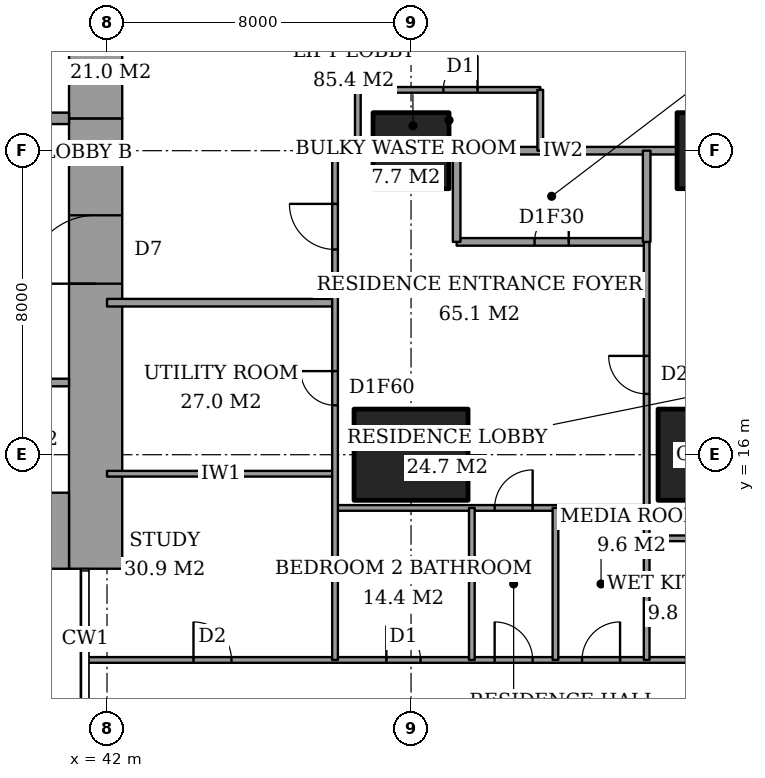
"""IFC4 building model, lengths in metres.
Left out: names, types, materials, properties, quantities, classifications, styles, units other than length and angle.
Written with IfcOpenShell. Run it as: python <this file> out.ifc"""

import sys

from ifc_helpers import new_model, si_unit, direction, frame, frame_2d, origin, origin_2d, place, context, subcontext, project, spatial, rectangle, extrude, element, fill, save


model = new_model("IFC4")
c1 = context("Model", 3, precision=1e-05, world=origin(), true_north=direction((0.0, 1.0)))
c2 = subcontext(c1, "Body", "Model", "MODEL_VIEW")
j1 = project(units=[si_unit("LENGTHUNIT", "METRE"), si_unit("PLANEANGLEUNIT", "RADIAN")], contexts=[c1])
p1 = place(None, origin())
s1 = spatial("IfcSite", under=j1, at=p1, CompositionType="ELEMENT")
p2 = place(p1, origin())
s2 = spatial("IfcBuilding", under=s1, at=p2, CompositionType="ELEMENT")
p3 = place(p2, frame((0.0, 0.0, 33.2)))
s3 = spatial("IfcBuildingStorey", under=s2, at=p3, CompositionType="ELEMENT", Elevation=33.2)
p4 = place(p3, frame((50.0, 16.0, 0.0), z_axis=(0.0, 0.0, 1.0), x_axis=(1.0, 0.0, 0.0)))
e1 = element("IfcColumn", 1, at=p4, inside=s3, PredefinedType="COLUMN", context=c2, shape_type="SweptSolid", body=[
    extrude(rectangle(XDim=3.0, YDim=2.4, at=origin_2d()), origin(), (0.0, 0.0, 1.0), 3.6),
])
p5 = place(p3, frame((50.0, 24.0, 0.0), z_axis=(0.0, 0.0, 1.0), x_axis=(1.0, 0.0, 0.0)))
e2 = element("IfcColumn", 2, at=p5, inside=s3, PredefinedType="COLUMN", context=c2, shape_type="SweptSolid", body=[
    extrude(rectangle(XDim=2.0, YDim=2.0, at=origin_2d()), origin(), (0.0, 0.0, 1.0), 3.6),
])
p6 = place(p3, frame((58.0, 16.0, 0.0), z_axis=(0.0, 0.0, 1.0), x_axis=(1.0, 0.0, 0.0)))
e3 = element("IfcColumn", 3, at=p6, inside=s3, PredefinedType="COLUMN", context=c2, shape_type="SweptSolid", body=[
    extrude(rectangle(XDim=3.0, YDim=2.4, at=origin_2d()), origin(), (0.0, 0.0, 1.0), 3.6),
])
p7 = place(p3, frame((58.0, 24.0, 0.0), z_axis=(0.0, 0.0, 1.0), x_axis=(1.0, 0.0, 0.0)))
e4 = element("IfcColumn", 4, at=p7, inside=s3, PredefinedType="COLUMN", context=c2, shape_type="SweptSolid", body=[
    extrude(rectangle(XDim=2.0, YDim=2.0, at=origin_2d()), origin(), (0.0, 0.0, 1.0), 3.6),
])
p8 = place(p3, frame((37.85, 14.0, 0.0), z_axis=(0.0, 0.0, 1.0), x_axis=(1.0, 0.0, 0.0)))
e5 = element("IfcWall", 5, at=p8, inside=s3, PredefinedType="SHEAR", context=c2, shape_type="SweptSolid", body=[
    extrude(rectangle(XDim=3.15, YDim=2.0, at=frame_2d((1.575, 0.0))), origin(), (0.0, 0.0, 1.0), 3.6),
])
p9 = place(p3, frame((41.7, 13.0, 0.0), z_axis=(0.0, 0.0, 1.0), x_axis=(0.0, 1.0, 0.0)))
e6 = element("IfcWall", 6, at=p9, inside=s3, PredefinedType="SHEAR", context=c2, shape_type="SweptSolid", body=[
    extrude(rectangle(XDim=11.85, YDim=1.4, at=frame_2d((5.925, 0.0))), origin(), (0.0, 0.0, 1.0), 3.6),
])
p10 = place(p9, frame((7.5, 0.0, 0.0)))
e7 = element("IfcOpeningElement", 7, at=p10, cuts=e6, PredefinedType="OPENING", context=c2, shape_type="SweptSolid", body=[
    extrude(rectangle(XDim=1.8, YDim=2.4, at=frame_2d((0.9, 1.2))), frame((0.0, 0.71, 0.0), z_axis=(0.0, -1.0, 0.0), x_axis=(1.0, 0.0, 0.0)), (0.0, 0.0, 1.0), 1.42),
])
p11 = place(p3, frame((41.7, 24.85, 0.0), z_axis=(0.0, 0.0, 1.0), x_axis=(0.0, 1.0, 0.0)))
e8 = element("IfcWall", 8, at=p11, inside=s3, PredefinedType="SHEAR", context=c2, shape_type="SweptSolid", body=[
    extrude(rectangle(XDim=10.15, YDim=1.4, at=frame_2d((5.075, 0.0))), origin(), (0.0, 0.0, 1.0), 3.6),
])
p12 = place(p3, frame((37.85, 24.85, 0.0), z_axis=(0.0, 0.0, 1.0), x_axis=(1.0, 0.0, 0.0)))
e9 = element("IfcWall", 9, at=p12, inside=s3, PredefinedType="SHEAR", context=c2, shape_type="SweptSolid", body=[
    extrude(rectangle(XDim=3.15, YDim=0.3, at=frame_2d((1.575, 0.0))), origin(), (0.0, 0.0, 1.0), 3.6),
])
p13 = place(p12, frame((0.95, 0.0, 0.0)))
e10 = element("IfcOpeningElement", 10, at=p13, cuts=e9, PredefinedType="OPENING", context=c2, shape_type="SweptSolid", body=[
    extrude(rectangle(XDim=1.0, YDim=2.1, at=frame_2d((0.5, 1.05))), frame((0.0, 0.16, 0.0), z_axis=(0.0, -1.0, 0.0), x_axis=(1.0, 0.0, 0.0)), (0.0, 0.0, 1.0), 0.32),
])
p14 = place(p3, frame((41.439, 10.6, 0.0), z_axis=(0.0, 0.0, 1.0), x_axis=(1.0, 0.0, 0.0)))
e11 = element("IfcWall", 11, at=p14, inside=s3, PredefinedType="PARTITIONING", context=c2, shape_type="SweptSolid", body=[
    extrude(rectangle(XDim=25.011, YDim=0.15, at=frame_2d((12.505, 0.0))), origin(), (0.0, 0.0, 1.0), 3.35),
])
p15 = place(p14, frame((10.761, 0.0, 0.0)))
e12 = element("IfcOpeningElement", 12, at=p15, cuts=e11, PredefinedType="OPENING", context=c2, shape_type="SweptSolid", body=[
    extrude(rectangle(XDim=1.0, YDim=2.1, at=frame_2d((0.5, 1.05))), frame((0.0, 0.085, 0.0), z_axis=(0.0, -1.0, 0.0), x_axis=(1.0, 0.0, 0.0)), (0.0, 0.0, 1.0), 0.17),
])
p16 = place(p14, frame((20.924, 0.0, 0.0)))
e13 = element("IfcOpeningElement", 13, at=p16, cuts=e11, PredefinedType="OPENING", context=c2, shape_type="SweptSolid", body=[
    extrude(rectangle(XDim=1.0, YDim=2.1, at=frame_2d((0.5, 1.05))), frame((0.0, 0.085, 0.0), z_axis=(0.0, -1.0, 0.0), x_axis=(1.0, 0.0, 0.0)), (0.0, 0.0, 1.0), 0.17),
])
p17 = place(p14, frame((15.799, 0.0, 0.0)))
e14 = element("IfcOpeningElement", 14, at=p17, cuts=e11, PredefinedType="OPENING", context=c2, shape_type="SweptSolid", body=[
    extrude(rectangle(XDim=1.0, YDim=2.1, at=frame_2d((0.5, 1.05))), frame((0.0, 0.085, 0.0), z_axis=(0.0, -1.0, 0.0), x_axis=(1.0, 0.0, 0.0)), (0.0, 0.0, 1.0), 0.17),
])
p18 = place(p14, frame((13.061, 0.0, 0.0)))
e15 = element("IfcOpeningElement", 15, at=p18, cuts=e11, PredefinedType="OPENING", context=c2, shape_type="SweptSolid", body=[
    extrude(rectangle(XDim=1.0, YDim=2.1, at=frame_2d((0.5, 1.05))), frame((0.0, 0.085, 0.0), z_axis=(0.0, -1.0, 0.0), x_axis=(1.0, 0.0, 0.0)), (0.0, 0.0, 1.0), 0.17),
])
p19 = place(p14, frame((7.911, 0.0, 0.0)))
e16 = element("IfcOpeningElement", 16, at=p19, cuts=e11, PredefinedType="OPENING", context=c2, shape_type="SweptSolid", body=[
    extrude(rectangle(XDim=0.9, YDim=2.1, at=frame_2d((0.45, 1.05))), frame((0.0, 0.085, 0.0), z_axis=(0.0, -1.0, 0.0), x_axis=(1.0, 0.0, 0.0)), (0.0, 0.0, 1.0), 0.17),
])
p20 = place(p14, frame((2.836, 0.0, 0.0)))
e17 = element("IfcOpeningElement", 17, at=p20, cuts=e11, PredefinedType="OPENING", context=c2, shape_type="SweptSolid", body=[
    extrude(rectangle(XDim=1.0, YDim=2.1, at=frame_2d((0.5, 1.05))), frame((0.0, 0.085, 0.0), z_axis=(0.0, -1.0, 0.0), x_axis=(1.0, 0.0, 0.0)), (0.0, 0.0, 1.0), 0.17),
])
p21 = place(p3, frame((56.2, 13.8, 0.0), z_axis=(0.0, 0.0, 1.0), x_axis=(1.0, 0.0, 0.0)))
e18 = element("IfcWall", 18, at=p21, inside=s3, PredefinedType="PARTITIONING", context=c2, shape_type="SweptSolid", body=[
    extrude(rectangle(XDim=3.075, YDim=0.15, at=frame_2d((1.538, 0.0))), origin(), (0.0, 0.0, 1.0), 3.35),
])
p22 = place(p3, frame((48.0, 14.6, 0.0), z_axis=(0.0, 0.0, 1.0), x_axis=(1.0, 0.0, 0.0)))
e19 = element("IfcWall", 19, at=p22, inside=s3, PredefinedType="PARTITIONING", context=c2, shape_type="SweptSolid", body=[
    extrude(rectangle(XDim=8.2, YDim=0.15, at=frame_2d((4.1, 0.0))), origin(), (0.0, 0.0, 1.0), 3.35),
])
p23 = place(p22, frame((4.2, 0.0, 0.0)))
e20 = element("IfcOpeningElement", 20, at=p23, cuts=e19, PredefinedType="OPENING", context=c2, shape_type="SweptSolid", body=[
    extrude(rectangle(XDim=1.0, YDim=2.1, at=frame_2d((0.5, 1.05))), frame((0.0, 0.085, 0.0), z_axis=(0.0, -1.0, 0.0), x_axis=(1.0, 0.0, 0.0)), (0.0, 0.0, 1.0), 0.17),
])
p24 = place(p3, frame((42.0, 15.5, 0.0), z_axis=(0.0, 0.0, 1.0), x_axis=(1.0, 0.0, 0.0)))
e21 = element("IfcWall", 21, at=p24, inside=s3, PredefinedType="PARTITIONING", context=c2, shape_type="SweptSolid", body=[
    extrude(rectangle(XDim=6.0, YDim=0.15, at=frame_2d((3.0, 0.0))), origin(), (0.0, 0.0, 1.0), 3.35),
])
p25 = place(p3, frame((42.0, 20.0, 0.0), z_axis=(0.0, 0.0, 1.0), x_axis=(1.0, 0.0, 0.0)))
e22 = element("IfcWall", 22, at=p25, inside=s3, PredefinedType="PARTITIONING", context=c2, shape_type="SweptSolid", body=[
    extrude(rectangle(XDim=6.0, YDim=0.2, at=frame_2d((3.0, 0.0))), origin(), (0.0, 0.0, 1.0), 3.35),
])
p26 = place(p3, frame((51.2, 21.6, 0.0), z_axis=(0.0, 0.0, 1.0), x_axis=(1.0, 0.0, 0.0)))
e23 = element("IfcWall", 23, at=p26, inside=s3, PredefinedType="PARTITIONING", context=c2, shape_type="SweptSolid", body=[
    extrude(rectangle(XDim=5.0, YDim=0.2, at=frame_2d((2.5, 0.0))), origin(), (0.0, 0.0, 1.0), 3.35),
])
p27 = place(p26, frame((2.05, 0.0, 0.0)))
e24 = element("IfcOpeningElement", 24, at=p27, cuts=e23, PredefinedType="OPENING", context=c2, shape_type="SweptSolid", body=[
    extrude(rectangle(XDim=0.9, YDim=2.1, at=frame_2d((0.45, 1.05))), frame((0.0, 0.11, 0.0), z_axis=(0.0, -1.0, 0.0), x_axis=(1.0, 0.0, 0.0)), (0.0, 0.0, 1.0), 0.22),
])
p28 = place(p3, frame((48.0, 24.0, 0.0), z_axis=(0.0, 0.0, 1.0), x_axis=(1.0, 0.0, 0.0)))
e25 = element("IfcWall", 25, at=p28, inside=s3, PredefinedType="PARTITIONING", context=c2, shape_type="SweptSolid", body=[
    extrude(rectangle(XDim=1.0, YDim=0.2, at=frame_2d((0.5, 0.0))), origin(), (0.0, 0.0, 1.0), 3.35),
])
p29 = place(p3, frame((51.0, 24.0, 0.0), z_axis=(0.0, 0.0, 1.0), x_axis=(1.0, 0.0, 0.0)))
e26 = element("IfcWall", 26, at=p29, inside=s3, PredefinedType="PARTITIONING", context=c2, shape_type="SweptSolid", body=[
    extrude(rectangle(XDim=6.0, YDim=0.2, at=frame_2d((3.0, 0.0))), origin(), (0.0, 0.0, 1.0), 3.35),
])
p30 = place(p3, frame((48.6, 25.6, 0.0), z_axis=(0.0, 0.0, 1.0), x_axis=(1.0, 0.0, 0.0)))
e27 = element("IfcWall", 27, at=p30, inside=s3, PredefinedType="PARTITIONING", context=c2, shape_type="SweptSolid", body=[
    extrude(rectangle(XDim=4.8, YDim=0.15, at=frame_2d((2.4, 0.0))), origin(), (0.0, 0.0, 1.0), 3.35),
])
p31 = place(p30, frame((2.25, 0.0, 0.0)))
e28 = element("IfcOpeningElement", 28, at=p31, cuts=e27, PredefinedType="OPENING", context=c2, shape_type="SweptSolid", body=[
    extrude(rectangle(XDim=0.9, YDim=2.1, at=frame_2d((0.45, 1.05))), frame((0.0, 0.085, 0.0), z_axis=(0.0, -1.0, 0.0), x_axis=(1.0, 0.0, 0.0)), (0.0, 0.0, 1.0), 0.17),
])
p32 = place(p3, frame((48.0, 10.6, 0.0), z_axis=(0.0, 0.0, 1.0), x_axis=(0.0, 1.0, 0.0)))
e29 = element("IfcWall", 29, at=p32, inside=s3, PredefinedType="PARTITIONING", context=c2, shape_type="SweptSolid", body=[
    extrude(rectangle(XDim=13.4, YDim=0.15, at=frame_2d((6.7, 0.0))), origin(), (0.0, 0.0, 1.0), 3.35),
])
p33 = place(p32, frame((10.8, 0.0, 0.0)))
e30 = element("IfcOpeningElement", 30, at=p33, cuts=e29, PredefinedType="OPENING", context=c2, shape_type="SweptSolid", body=[
    extrude(rectangle(XDim=1.2, YDim=2.4, at=frame_2d((0.6, 1.2))), frame((0.0, 0.085, 0.0), z_axis=(0.0, -1.0, 0.0), x_axis=(1.0, 0.0, 0.0)), (0.0, 0.0, 1.0), 0.17),
])
p34 = place(p32, frame((6.7, 0.0, 0.0)))
e31 = element("IfcOpeningElement", 31, at=p34, cuts=e29, PredefinedType="OPENING", context=c2, shape_type="SweptSolid", body=[
    extrude(rectangle(XDim=0.9, YDim=2.1, at=frame_2d((0.45, 1.05))), frame((0.0, 0.085, 0.0), z_axis=(0.0, -1.0, 0.0), x_axis=(1.0, 0.0, 0.0)), (0.0, 0.0, 1.0), 0.17),
])
p35 = place(p3, frame((48.6, 24.0, 0.0), z_axis=(0.0, 0.0, 1.0), x_axis=(0.0, 1.0, 0.0)))
e32 = element("IfcWall", 32, at=p35, inside=s3, PredefinedType="PARTITIONING", context=c2, shape_type="SweptSolid", body=[
    extrude(rectangle(XDim=1.6, YDim=0.15, at=frame_2d((0.8, 0.0))), origin(), (0.0, 0.0, 1.0), 3.35),
])
p36 = place(p3, frame((51.2, 21.6, 0.0), z_axis=(0.0, 0.0, 1.0), x_axis=(0.0, 1.0, 0.0)))
e33 = element("IfcWall", 33, at=p36, inside=s3, PredefinedType="PARTITIONING", context=c2, shape_type="SweptSolid", body=[
    extrude(rectangle(XDim=2.4, YDim=0.2, at=frame_2d((1.2, 0.0))), origin(), (0.0, 0.0, 1.0), 3.35),
])
p37 = place(p3, frame((51.6, 10.6, 0.0), z_axis=(0.0, 0.0, 1.0), x_axis=(0.0, 1.0, 0.0)))
e34 = element("IfcWall", 34, at=p37, inside=s3, PredefinedType="PARTITIONING", context=c2, shape_type="SweptSolid", body=[
    extrude(rectangle(XDim=4.0, YDim=0.15, at=frame_2d((2.0, 0.0))), origin(), (0.0, 0.0, 1.0), 3.35),
])
p38 = place(p3, frame((53.4, 24.0, 0.0), z_axis=(0.0, 0.0, 1.0), x_axis=(0.0, 1.0, 0.0)))
e35 = element("IfcWall", 35, at=p38, inside=s3, PredefinedType="PARTITIONING", context=c2, shape_type="SweptSolid", body=[
    extrude(rectangle(XDim=1.6, YDim=0.15, at=frame_2d((0.8, 0.0))), origin(), (0.0, 0.0, 1.0), 3.35),
])
p39 = place(p3, frame((53.8, 10.6, 0.0), z_axis=(0.0, 0.0, 1.0), x_axis=(0.0, 1.0, 0.0)))
e36 = element("IfcWall", 36, at=p39, inside=s3, PredefinedType="PARTITIONING", context=c2, shape_type="SweptSolid", body=[
    extrude(rectangle(XDim=4.0, YDim=0.15, at=frame_2d((2.0, 0.0))), origin(), (0.0, 0.0, 1.0), 3.35),
])
p40 = place(p3, frame((56.2, 21.6, 0.0), z_axis=(0.0, 0.0, 1.0), x_axis=(0.0, 1.0, 0.0)))
e37 = element("IfcWall", 37, at=p40, inside=s3, PredefinedType="PARTITIONING", context=c2, shape_type="SweptSolid", body=[
    extrude(rectangle(XDim=2.4, YDim=0.2, at=frame_2d((1.2, 0.0))), origin(), (0.0, 0.0, 1.0), 3.35),
])
p41 = place(p3, frame((56.2, 10.6, 0.0), z_axis=(0.0, 0.0, 1.0), x_axis=(0.0, 1.0, 0.0)))
e38 = element("IfcWall", 38, at=p41, inside=s3, PredefinedType="PARTITIONING", context=c2, shape_type="SweptSolid", body=[
    extrude(rectangle(XDim=11.0, YDim=0.15, at=frame_2d((5.5, 0.0))), origin(), (0.0, 0.0, 1.0), 3.35),
])
p42 = place(p41, frame((7.0, 0.0, 0.0)))
e39 = element("IfcOpeningElement", 39, at=p42, cuts=e38, PredefinedType="OPENING", context=c2, shape_type="SweptSolid", body=[
    extrude(rectangle(XDim=1.0, YDim=2.1, at=frame_2d((0.5, 1.05))), frame((0.0, 0.085, 0.0), z_axis=(0.0, -1.0, 0.0), x_axis=(1.0, 0.0, 0.0)), (0.0, 0.0, 1.0), 0.17),
])
p43 = place(p3, frame((28.3, 17.9, 0.0), z_axis=(0.0, 0.0, 1.0), x_axis=(1.0, 0.0, 0.0)))
e40 = element("IfcWall", 40, at=p43, inside=s3, PredefinedType="PARTITIONING", context=c2, shape_type="SweptSolid", body=[
    extrude(rectangle(XDim=12.7, YDim=0.2, at=frame_2d((6.35, 0.0))), origin(), (0.0, 0.0, 1.0), 3.6),
])
p44 = place(p43, frame((0.95, 0.0, 0.0)))
e41 = element("IfcOpeningElement", 41, at=p44, cuts=e40, PredefinedType="OPENING", context=c2, shape_type="SweptSolid", body=[
    extrude(rectangle(XDim=1.1, YDim=2.1, at=frame_2d((0.55, 1.05))), frame((0.0, 0.11, 0.0), z_axis=(0.0, -1.0, 0.0), x_axis=(1.0, 0.0, 0.0)), (0.0, 0.0, 1.0), 0.22),
])
p45 = place(p43, frame((4.15, 0.0, 0.0)))
e42 = element("IfcOpeningElement", 42, at=p45, cuts=e40, PredefinedType="OPENING", context=c2, shape_type="SweptSolid", body=[
    extrude(rectangle(XDim=1.1, YDim=2.1, at=frame_2d((0.55, 1.05))), frame((0.0, 0.11, 0.0), z_axis=(0.0, -1.0, 0.0), x_axis=(1.0, 0.0, 0.0)), (0.0, 0.0, 1.0), 0.22),
])
p46 = place(p43, frame((7.35, 0.0, 0.0)))
e43 = element("IfcOpeningElement", 43, at=p46, cuts=e40, PredefinedType="OPENING", context=c2, shape_type="SweptSolid", body=[
    extrude(rectangle(XDim=1.1, YDim=2.1, at=frame_2d((0.55, 1.05))), frame((0.0, 0.11, 0.0), z_axis=(0.0, -1.0, 0.0), x_axis=(1.0, 0.0, 0.0)), (0.0, 0.0, 1.0), 0.22),
])
p47 = place(p43, frame((10.6, 0.0, 0.0)))
e44 = element("IfcOpeningElement", 44, at=p47, cuts=e40, PredefinedType="OPENING", context=c2, shape_type="SweptSolid", body=[
    extrude(rectangle(XDim=1.2, YDim=2.1, at=frame_2d((0.6, 1.05))), frame((0.0, 0.11, 0.0), z_axis=(0.0, -1.0, 0.0), x_axis=(1.0, 0.0, 0.0)), (0.0, 0.0, 1.0), 0.22),
])
p48 = place(p15, origin())
e45 = element("IfcDoor", 45, at=p48, inside=s3, OperationType="SINGLE_SWING_RIGHT", PredefinedType="DOOR", context=c2, shape_type="SweptSolid", body=[
    extrude(rectangle(XDim=1.0, YDim=2.1, at=frame_2d((0.5, 1.05))), frame((0.0, 0.025, 0.0), z_axis=(0.0, -1.0, 0.0), x_axis=(1.0, 0.0, 0.0)), (0.0, 0.0, 1.0), 0.05),
])
fill(e12, e45)
p49 = place(p42, origin())
e46 = element("IfcDoor", 46, at=p49, inside=s3, OperationType="SINGLE_SWING_LEFT", PredefinedType="DOOR", context=c2, shape_type="SweptSolid", body=[
    extrude(rectangle(XDim=1.0, YDim=2.1, at=frame_2d((0.5, 1.05))), frame((0.0, 0.025, 0.0), z_axis=(0.0, -1.0, 0.0), x_axis=(1.0, 0.0, 0.0)), (0.0, 0.0, 1.0), 0.05),
])
fill(e39, e46)
p50 = place(p27, origin())
e47 = element("IfcDoor", 47, at=p50, inside=s3, OperationType="SINGLE_SWING_LEFT", PredefinedType="DOOR", context=c2, shape_type="SweptSolid", body=[
    extrude(rectangle(XDim=0.9, YDim=2.1, at=frame_2d((0.45, 1.05))), frame((0.0, 0.025, 0.0), z_axis=(0.0, -1.0, 0.0), x_axis=(1.0, 0.0, 0.0)), (0.0, 0.0, 1.0), 0.05),
])
fill(e24, e47)
p51 = place(p33, origin())
e48 = element("IfcDoor", 48, at=p51, inside=s3, OperationType="SINGLE_SWING_LEFT", PredefinedType="DOOR", context=c2, shape_type="SweptSolid", body=[
    extrude(rectangle(XDim=1.2, YDim=2.4, at=frame_2d((0.6, 1.2))), frame((0.0, 0.025, 0.0), z_axis=(0.0, -1.0, 0.0), x_axis=(1.0, 0.0, 0.0)), (0.0, 0.0, 1.0), 0.05),
])
fill(e30, e48)
p52 = place(p18, origin())
e49 = element("IfcDoor", 49, at=p52, inside=s3, OperationType="SINGLE_SWING_LEFT", PredefinedType="DOOR", context=c2, shape_type="SweptSolid", body=[
    extrude(rectangle(XDim=1.0, YDim=2.1, at=frame_2d((0.5, 1.05))), frame((0.0, 0.025, 0.0), z_axis=(0.0, -1.0, 0.0), x_axis=(1.0, 0.0, 0.0)), (0.0, 0.0, 1.0), 0.05),
])
fill(e15, e49)
p53 = place(p23, origin())
e50 = element("IfcDoor", 50, at=p53, inside=s3, OperationType="SINGLE_SWING_LEFT", PredefinedType="DOOR", context=c2, shape_type="SweptSolid", body=[
    extrude(rectangle(XDim=1.0, YDim=2.1, at=frame_2d((0.5, 1.05))), frame((0.0, 0.025, 0.0), z_axis=(0.0, -1.0, 0.0), x_axis=(1.0, 0.0, 0.0)), (0.0, 0.0, 1.0), 0.05),
])
fill(e20, e50)
p54 = place(p19, origin())
e51 = element("IfcDoor", 51, at=p54, inside=s3, OperationType="SINGLE_SWING_RIGHT", PredefinedType="DOOR", context=c2, shape_type="SweptSolid", body=[
    extrude(rectangle(XDim=0.9, YDim=2.1, at=frame_2d((0.45, 1.05))), frame((0.0, 0.025, 0.0), z_axis=(0.0, -1.0, 0.0), x_axis=(1.0, 0.0, 0.0)), (0.0, 0.0, 1.0), 0.05),
])
fill(e16, e51)
p55 = place(p20, origin())
e52 = element("IfcDoor", 52, at=p55, inside=s3, OperationType="SINGLE_SWING_RIGHT", PredefinedType="DOOR", context=c2, shape_type="SweptSolid", body=[
    extrude(rectangle(XDim=1.0, YDim=2.1, at=frame_2d((0.5, 1.05))), frame((0.0, 0.025, 0.0), z_axis=(0.0, -1.0, 0.0), x_axis=(1.0, 0.0, 0.0)), (0.0, 0.0, 1.0), 0.05),
])
fill(e17, e52)
p56 = place(p34, origin())
e53 = element("IfcDoor", 53, at=p56, inside=s3, OperationType="SINGLE_SWING_LEFT", PredefinedType="DOOR", context=c2, shape_type="SweptSolid", body=[
    extrude(rectangle(XDim=0.9, YDim=2.1, at=frame_2d((0.45, 1.05))), frame((0.0, 0.025, 0.0), z_axis=(0.0, -1.0, 0.0), x_axis=(1.0, 0.0, 0.0)), (0.0, 0.0, 1.0), 0.05),
])
fill(e31, e53)
p57 = place(p31, origin())
e54 = element("IfcDoor", 54, at=p57, inside=s3, OperationType="SINGLE_SWING_LEFT", PredefinedType="DOOR", context=c2, shape_type="SweptSolid", body=[
    extrude(rectangle(XDim=0.9, YDim=2.1, at=frame_2d((0.45, 1.05))), frame((0.0, 0.025, 0.0), z_axis=(0.0, -1.0, 0.0), x_axis=(1.0, 0.0, 0.0)), (0.0, 0.0, 1.0), 0.05),
])
fill(e28, e54)
p58 = place(p10, origin())
e55 = element("IfcDoor", 55, at=p58, inside=s3, OperationType="DOUBLE_DOOR_DOUBLE_SWING", PredefinedType="DOOR", context=c2, shape_type="SweptSolid", body=[
    extrude(rectangle(XDim=1.8, YDim=2.4, at=frame_2d((0.9, 1.2))), frame((0.0, 0.025, 0.0), z_axis=(0.0, -1.0, 0.0), x_axis=(1.0, 0.0, 0.0)), (0.0, 0.0, 1.0), 0.05),
])
fill(e7, e55)
save(model, sys.argv[1])
